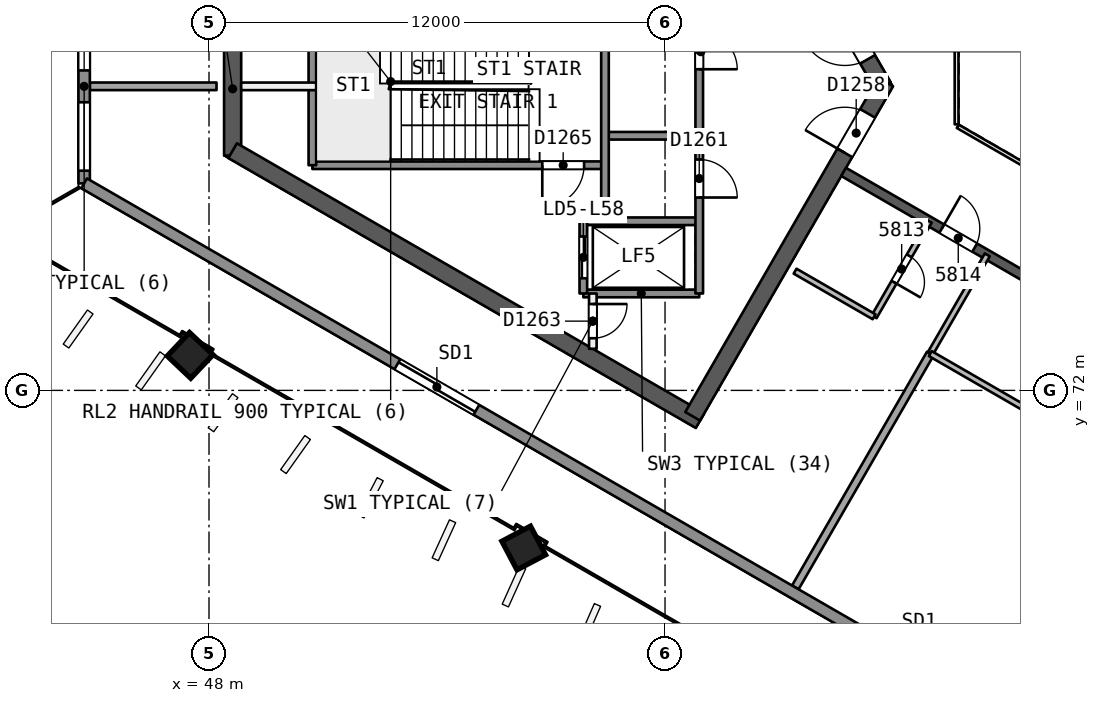
"""IFC4 building model, lengths in metres.
Left out: names, types, materials, properties, quantities, classifications, styles, units other than length and angle.
Written with IfcOpenShell. Run it as: python <this file> out.ifc"""

import sys

from ifc_helpers import new_model, si_unit, direction, frame, frame_2d, origin, origin_2d, place, context, subcontext, project, spatial, rectangle, extrude, element, fill, save


model = new_model("IFC4")
c1 = context("Model", 3, precision=1e-05, world=origin(), true_north=direction((0.0, 1.0)))
c2 = subcontext(c1, "Body", "Model", "MODEL_VIEW")
j1 = project(units=[si_unit("LENGTHUNIT", "METRE"), si_unit("PLANEANGLEUNIT", "RADIAN")], contexts=[c1])
p1 = place(None, origin())
s1 = spatial("IfcSite", under=j1, at=p1, CompositionType="ELEMENT")
p2 = place(p1, origin())
s2 = spatial("IfcBuilding", under=s1, at=p2, CompositionType="ELEMENT")
p3 = place(p2, frame((0.0, 0.0, 235.4)))
s3 = spatial("IfcBuildingStorey", under=s2, at=p3, CompositionType="ELEMENT", Elevation=235.4)
p4 = place(p3, frame((65.74, 80.0, 0.0), z_axis=(0.0, 0.0, 1.0), x_axis=(-0.499991857942, 0.866030104553, 0.0)))
e1 = element("IfcWall", 1, at=p4, inside=s3, PredefinedType="SHEAR", context=c2, shape_type="SweptSolid", body=[
    extrude(rectangle(XDim=10.25, YDim=0.45, at=frame_2d((5.125, 0.0))), origin(), (0.0, 0.0, 1.0), 3.7),
])
p5 = place(p4, frame((0.82, 0.0, 0.0)))
e2 = element("IfcOpeningElement", 2, at=p5, cuts=e1, PredefinedType="OPENING", context=c2, shape_type="SweptSolid", body=[
    extrude(rectangle(XDim=1.2, YDim=2.1, at=frame_2d((0.6, 1.05))), frame((0.0, 0.235, 0.0), z_axis=(0.0, -1.0, 0.0), x_axis=(1.0, 0.0, 0.0)), (0.0, 0.0, 1.0), 0.471),
])
p6 = place(p3, frame((48.622, 81.693, 0.0), z_axis=(0.0, 0.0, 1.0), x_axis=(0.0, -1.0, 0.0)))
e3 = element("IfcWall", 3, at=p6, inside=s3, PredefinedType="SHEAR", context=c2, shape_type="SweptSolid", body=[
    extrude(rectangle(XDim=3.515, YDim=0.45, at=frame_2d((1.758, 0.0))), origin(), (0.0, 0.0, 1.0), 3.7),
])
p7 = place(p3, frame((48.622, 78.307, 0.0), z_axis=(0.0, 0.0, 1.0), x_axis=(0.86602701116, -0.499997215934, 0.0)))
e4 = element("IfcWall", 4, at=p7, inside=s3, PredefinedType="SHEAR", context=c2, shape_type="SweptSolid", body=[
    extrude(rectangle(XDim=14.204, YDim=0.45, at=frame_2d((7.102, 0.0))), origin(), (0.0, 0.0, 1.0), 3.7),
])
p8 = place(p3, frame((60.728, 71.318, 0.0), z_axis=(0.0, 0.0, 1.0), x_axis=(0.500012416173, 0.866018235185, 0.0)))
e5 = element("IfcWall", 5, at=p8, inside=s3, PredefinedType="SHEAR", context=c2, shape_type="SweptSolid", body=[
    extrude(rectangle(XDim=10.155, YDim=0.45, at=frame_2d((5.078, 0.0))), origin(), (0.0, 0.0, 1.0), 3.7),
])
p9 = place(p8, frame((8.005, 0.0, 0.0)))
e6 = element("IfcOpeningElement", 6, at=p9, cuts=e5, PredefinedType="OPENING", context=c2, shape_type="SweptSolid", body=[
    extrude(rectangle(XDim=1.2, YDim=2.1, at=frame_2d((0.6, 1.05))), frame((0.0, 0.235, 0.0), z_axis=(0.0, -1.0, 0.0), x_axis=(1.0, 0.0, 0.0)), (0.0, 0.0, 1.0), 0.471),
])
p10 = place(p3, frame((64.7, 77.748, 0.0), z_axis=(0.0, 0.0, 1.0), x_axis=(0.866026492143, -0.499998114903, 0.0)))
e7 = element("IfcWall", 7, at=p10, inside=s3, PredefinedType="SHEAR", context=c2, shape_type="SweptSolid", body=[
    extrude(rectangle(XDim=15.588, YDim=0.25, at=frame_2d((7.794, 0.0))), origin(), (0.0, 0.0, 1.0), 3.3),
])
p11 = place(p10, frame((2.982, 0.0, 0.0)))
e8 = element("IfcOpeningElement", 8, at=p11, cuts=e7, PredefinedType="OPENING", context=c2, shape_type="SweptSolid", body=[
    extrude(rectangle(XDim=1.0, YDim=2.1, at=frame_2d((0.5, 1.05))), frame((0.0, 0.135, 0.0), z_axis=(0.0, -1.0, 0.0), x_axis=(1.0, 0.0, 0.0)), (0.0, 0.0, 1.0), 0.271),
])
p12 = place(p10, frame((8.538, 0.0, 0.0)))
e9 = element("IfcOpeningElement", 9, at=p12, cuts=e7, PredefinedType="OPENING", context=c2, shape_type="SweptSolid", body=[
    extrude(rectangle(XDim=1.1, YDim=2.1, at=frame_2d((0.55, 1.05))), frame((0.0, 0.135, 0.0), z_axis=(0.0, -1.0, 0.0), x_axis=(1.0, 0.0, 0.0)), (0.0, 0.0, 1.0), 0.271),
])
p13 = place(p10, frame((11.45, 0.0, 0.0)))
e10 = element("IfcOpeningElement", 10, at=p13, cuts=e7, PredefinedType="OPENING", context=c2, shape_type="SweptSolid", body=[
    extrude(rectangle(XDim=1.0, YDim=2.1, at=frame_2d((0.5, 1.05))), frame((0.0, 0.135, 0.0), z_axis=(0.0, -1.0, 0.0), x_axis=(1.0, 0.0, 0.0)), (0.0, 0.0, 1.0), 0.271),
])
p14 = place(p3, frame((47.469, 72.913, 0.0), z_axis=(0.028557232129, 0.006793059837, 0.999569076568), x_axis=(-0.865318806464, 0.500768292431, 0.021318547709)))
e11 = element("IfcColumn", 11, at=p14, inside=s3, PredefinedType="COLUMN", context=c2, shape_type="SweptSolid", body=[
    extrude(rectangle(XDim=0.85, YDim=0.85, at=origin_2d()), origin(), (0.0, 0.0, 1.0), 3.702),
])
p15 = place(p3, frame((56.259, 67.838, 0.0), z_axis=(0.019327242333, 0.012137244332, 0.999739538582), x_axis=(-0.865685903399, 0.500474062253, 0.01065972171)))
e12 = element("IfcColumn", 12, at=p15, inside=s3, PredefinedType="COLUMN", context=c2, shape_type="SweptSolid", body=[
    extrude(rectangle(XDim=0.85, YDim=0.85, at=origin_2d()), origin(), (0.0, 0.0, 1.0), 3.701),
])
p16 = place(p3, frame((44.864, 80.001, 0.0), z_axis=(0.0, 0.0, 1.0), x_axis=(1.0, 0.0, 0.0)))
e13 = element("IfcWall", 13, at=p16, inside=s3, PredefinedType="PARTITIONING", context=c2, shape_type="SweptSolid", body=[
    extrude(rectangle(XDim=3.334, YDim=0.2, at=frame_2d((1.667, 0.0))), origin(), (0.0, 0.0, 1.0), 3.3),
])
p17 = place(p3, frame((66.952, 76.448, 0.0), z_axis=(0.0, 0.0, 1.0), x_axis=(-0.499987231761, -0.866032775405, 0.0)))
e14 = element("IfcWall", 14, at=p17, inside=s3, PredefinedType="PARTITIONING", context=c2, shape_type="SweptSolid", body=[
    extrude(rectangle(XDim=2.9, YDim=0.15, at=frame_2d((1.45, 0.0))), origin(), (0.0, 0.0, 1.0), 3.3),
])
p18 = place(p17, frame((1.05, 0.0, 0.0)))
e15 = element("IfcOpeningElement", 15, at=p18, cuts=e14, PredefinedType="OPENING", context=c2, shape_type="SweptSolid", body=[
    extrude(rectangle(XDim=0.8, YDim=2.1, at=frame_2d((0.4, 1.05))), frame((0.0, 0.085, 0.0), z_axis=(0.0, -1.0, 0.0), x_axis=(1.0, 0.0, 0.0)), (0.0, 0.0, 1.0), 0.171),
])
p19 = place(p3, frame((65.502, 73.937, 0.0), z_axis=(0.0, 0.0, 1.0), x_axis=(-0.865994240961, 0.500053971709, 0.0)))
e16 = element("IfcWall", 16, at=p19, inside=s3, PredefinedType="PARTITIONING", context=c2, shape_type="SweptSolid", body=[
    extrude(rectangle(XDim=2.401, YDim=0.15, at=frame_2d((1.201, 0.0))), origin(), (0.0, 0.0, 1.0), 3.3),
])
p20 = place(p3, frame((63.428, 66.815, 0.0), z_axis=(0.0, 0.0, 1.0), x_axis=(0.499994154718, 0.866028778533, 0.0)))
e17 = element("IfcWall", 17, at=p20, inside=s3, PredefinedType="PARTITIONING", context=c2, shape_type="SweptSolid", body=[
    extrude(rectangle(XDim=7.104, YDim=0.2, at=frame_2d((3.552, 0.0))), origin(), (0.0, 0.0, 1.0), 3.3),
])
p21 = place(p3, frame((66.98, 72.968, 0.0), z_axis=(0.0, 0.0, 1.0), x_axis=(0.499990139034, 0.866031096941, 0.0)))
e18 = element("IfcWall", 18, at=p21, inside=s3, PredefinedType="PARTITIONING", context=c2, shape_type="SweptSolid", body=[
    extrude(rectangle(XDim=3.0, YDim=0.15, at=frame_2d((1.5, 0.0))), origin(), (0.0, 0.0, 1.0), 3.3),
])
p22 = place(p3, frame((69.491, 71.518, 0.0), z_axis=(0.0, 0.0, 1.0), x_axis=(-0.866032775405, 0.499987231761, 0.0)))
e19 = element("IfcWall", 19, at=p22, inside=s3, PredefinedType="PARTITIONING", context=c2, shape_type="SweptSolid", body=[
    extrude(rectangle(XDim=2.9, YDim=0.15, at=frame_2d((1.45, 0.0))), origin(), (0.0, 0.0, 1.0), 3.3),
])
p23 = place(p3, frame((69.098, 63.542, 0.0), z_axis=(0.0, 0.0, 1.0), x_axis=(0.499992962407, 0.866029466902, 0.0)))
e20 = element("IfcWall", 20, at=p23, inside=s3, PredefinedType="PARTITIONING", context=c2, shape_type="SweptSolid", body=[
    extrude(rectangle(XDim=10.104, YDim=0.2, at=frame_2d((5.052, 0.0))), origin(), (0.0, 0.0, 1.0), 3.3),
])
p24 = place(p3, frame((44.715, 77.448, 0.0), z_axis=(0.0, 0.0, 1.0), x_axis=(0.0, 1.0, 0.0)))
e21 = element("IfcWall", 21, at=p24, inside=s3, PredefinedType="SOLIDWALL", context=c2, shape_type="SweptSolid", body=[
    extrude(rectangle(XDim=5.105, YDim=0.3, at=frame_2d((2.552, 0.0))), origin(), (0.0, 0.0, 1.0), 3.3),
])
p25 = place(p24, frame((2.972, 0.0, 0.9)))
e22 = element("IfcOpeningElement", 22, at=p25, cuts=e21, PredefinedType="OPENING", context=c2, shape_type="SweptSolid", body=[
    extrude(rectangle(XDim=1.8, YDim=1.5, at=frame_2d((0.9, 0.75))), frame((0.0, 0.161, 0.0), z_axis=(0.0, -1.0, 0.0), x_axis=(1.0, 0.0, 0.0)), (0.0, 0.0, 1.0), 0.321),
])
p26 = place(p24, frame((0.333, 0.0, 0.9)))
e23 = element("IfcOpeningElement", 23, at=p26, cuts=e21, PredefinedType="OPENING", context=c2, shape_type="SweptSolid", body=[
    extrude(rectangle(XDim=1.8, YDim=1.5, at=frame_2d((0.9, 0.75))), frame((0.0, 0.161, 0.0), z_axis=(0.0, -1.0, 0.0), x_axis=(1.0, 0.0, 0.0)), (0.0, 0.0, 1.0), 0.321),
])
p27 = place(p3, frame((87.932, 52.496, 0.0), z_axis=(0.0, 0.0, 1.0), x_axis=(-0.866025334516, 0.500000119977, 0.0)))
e24 = element("IfcWall", 24, at=p27, inside=s3, PredefinedType="SOLIDWALL", context=c2, shape_type="SweptSolid", body=[
    extrude(rectangle(XDim=49.903, YDim=0.3, at=frame_2d((24.952, 0.0))), origin(), (0.0, 0.0, 1.0), 3.3),
])
p28 = place(p27, frame((23.907, 0.0, 0.0)))
e25 = element("IfcOpeningElement", 25, at=p28, cuts=e24, PredefinedType="OPENING", context=c2, shape_type="SweptSolid", body=[
    extrude(rectangle(XDim=2.4, YDim=2.4, at=frame_2d((1.2, 1.2))), frame((0.0, 0.161, 0.0), z_axis=(0.0, -1.0, 0.0), x_axis=(1.0, 0.0, 0.0)), (0.0, 0.0, 1.0), 0.321),
])
p29 = place(p27, frame((37.985, 0.0, 0.0)))
e26 = element("IfcOpeningElement", 26, at=p29, cuts=e24, PredefinedType="OPENING", context=c2, shape_type="SweptSolid", body=[
    extrude(rectangle(XDim=2.4, YDim=2.4, at=frame_2d((1.2, 1.2))), frame((0.0, 0.161, 0.0), z_axis=(0.0, -1.0, 0.0), x_axis=(1.0, 0.0, 0.0)), (0.0, 0.0, 1.0), 0.321),
])
p30 = place(p27, frame((9.674, 0.0, 0.0)))
e27 = element("IfcOpeningElement", 27, at=p30, cuts=e24, PredefinedType="OPENING", context=c2, shape_type="SweptSolid", body=[
    extrude(rectangle(XDim=2.4, YDim=2.4, at=frame_2d((1.2, 1.2))), frame((0.0, 0.161, 0.0), z_axis=(0.0, -1.0, 0.0), x_axis=(1.0, 0.0, 0.0)), (0.0, 0.0, 1.0), 0.321),
])
p31 = place(p3, frame((50.82, 80.0, 0.0), z_axis=(0.0, 0.0, 1.0), x_axis=(-1.0, 0.0, 0.0)))
e28 = element("IfcWall", 28, at=p31, inside=s3, PredefinedType="PARTITIONING", context=c2, shape_type="SweptSolid", body=[
    extrude(rectangle(XDim=1.973, YDim=0.2, at=frame_2d((0.987, 0.0))), origin(), (0.0, 0.0, 1.0), 3.3),
])
p32 = place(p3, frame((60.9, 78.7, 0.0), z_axis=(0.0, 0.0, 1.0), x_axis=(-1.0, 0.0, 0.0)))
e29 = element("IfcWall", 29, at=p32, inside=s3, PredefinedType="SOLIDWALL", context=c2, shape_type="SweptSolid", body=[
    extrude(rectangle(XDim=2.48, YDim=0.2, at=frame_2d((1.24, 0.0))), origin(), (0.0, 0.0, 1.0), 3.3),
])
p33 = place(p3, frame((58.42, 77.925, 0.0), z_axis=(0.0, 0.0, 1.0), x_axis=(-1.0, 0.0, 0.0)))
e30 = element("IfcWall", 30, at=p33, inside=s3, PredefinedType="SOLIDWALL", context=c2, shape_type="SweptSolid", body=[
    extrude(rectangle(XDim=7.7, YDim=0.2, at=frame_2d((3.85, 0.0))), origin(), (0.0, 0.0, 1.0), 3.3),
])
p34 = place(p33, frame((0.55, 0.0, 0.0)))
e31 = element("IfcOpeningElement", 31, at=p34, cuts=e30, PredefinedType="OPENING", context=c2, shape_type="SweptSolid", body=[
    extrude(rectangle(XDim=1.1, YDim=2.1, at=frame_2d((0.55, 1.05))), frame((0.0, 0.11, 0.0), z_axis=(0.0, -1.0, 0.0), x_axis=(1.0, 0.0, 0.0)), (0.0, 0.0, 1.0), 0.221),
])
for number, where, z_axis, x_axis in (
    (32, (60.9, 76.45, 0.0), (0.0, 0.0, 1.0), (-1.0, 0.0, 0.0)),
    (33, (60.9, 74.55, 0.0), (0.0, 0.0, 1.0), (-1.0, 0.0, 0.0)),
):
    element("IfcWall", number, at=place(p3, frame(where, z_axis=z_axis, x_axis=x_axis)), inside=s3, PredefinedType="SOLIDWALL", context=c2, shape_type="SweptSolid", body=[
        extrude(rectangle(XDim=3.05, YDim=0.2, at=frame_2d((1.525, 0.0))), origin(), (0.0, 0.0, 1.0), 3.3),
    ])
p35 = place(p3, frame((60.9, 85.45, 0.0), z_axis=(0.0, 0.0, 1.0), x_axis=(0.0, -1.0, 0.0)))
e34 = element("IfcWall", 34, at=p35, inside=s3, PredefinedType="SOLIDWALL", context=c2, shape_type="SweptSolid", body=[
    extrude(rectangle(XDim=10.9, YDim=0.2, at=frame_2d((5.45, 0.0))), origin(), (0.0, 0.0, 1.0), 3.3),
])
p36 = place(p35, frame((0.625, 0.0, 0.0)))
e35 = element("IfcOpeningElement", 35, at=p36, cuts=e34, PredefinedType="OPENING", context=c2, shape_type="SweptSolid", body=[
    extrude(rectangle(XDim=1.0, YDim=2.1, at=frame_2d((0.5, 1.05))), frame((0.0, 0.11, 0.0), z_axis=(0.0, -1.0, 0.0), x_axis=(1.0, 0.0, 0.0)), (0.0, 0.0, 1.0), 0.221),
])
p37 = place(p35, frame((4.0, 0.0, 0.0)))
e36 = element("IfcOpeningElement", 36, at=p37, cuts=e34, PredefinedType="OPENING", context=c2, shape_type="SweptSolid", body=[
    extrude(rectangle(XDim=1.0, YDim=2.1, at=frame_2d((0.5, 1.05))), frame((0.0, 0.11, 0.0), z_axis=(0.0, -1.0, 0.0), x_axis=(1.0, 0.0, 0.0)), (0.0, 0.0, 1.0), 0.221),
])
p38 = place(p35, frame((7.375, 0.0, 0.0)))
e37 = element("IfcOpeningElement", 37, at=p38, cuts=e34, PredefinedType="OPENING", context=c2, shape_type="SweptSolid", body=[
    extrude(rectangle(XDim=1.0, YDim=2.1, at=frame_2d((0.5, 1.05))), frame((0.0, 0.11, 0.0), z_axis=(0.0, -1.0, 0.0), x_axis=(1.0, 0.0, 0.0)), (0.0, 0.0, 1.0), 0.221),
])
p39 = place(p3, frame((58.42, 87.09, 0.0), z_axis=(0.0, 0.0, 1.0), x_axis=(0.0, -1.0, 0.0)))
e38 = element("IfcWall", 38, at=p39, inside=s3, PredefinedType="SOLIDWALL", context=c2, shape_type="SweptSolid", body=[
    extrude(rectangle(XDim=10.64, YDim=0.2, at=frame_2d((5.32, 0.0))), origin(), (0.0, 0.0, 1.0), 3.3),
])
p40 = place(p39, frame((0.37, 0.0, 0.0)))
e39 = element("IfcOpeningElement", 39, at=p40, cuts=e38, PredefinedType="OPENING", context=c2, shape_type="SweptSolid", body=[
    extrude(rectangle(XDim=0.9, YDim=2.1, at=frame_2d((0.45, 1.05))), frame((0.0, 0.11, 0.0), z_axis=(0.0, -1.0, 0.0), x_axis=(1.0, 0.0, 0.0)), (0.0, 0.0, 1.0), 0.221),
])
p41 = place(p3, frame((58.1, 74.55, 0.0), z_axis=(0.0, 0.0, 1.0), x_axis=(0.0, -1.0, 0.0)))
e40 = element("IfcWall", 40, at=p41, inside=s3, PredefinedType="PARTITIONING", context=c2, shape_type="SweptSolid", body=[
    extrude(rectangle(XDim=1.455, YDim=0.2, at=frame_2d((0.728, 0.0))), origin(), (0.0, 0.0, 1.0), 3.3),
])
p42 = place(p41, frame((0.278, 0.0, 0.0)))
e41 = element("IfcOpeningElement", 41, at=p42, cuts=e40, PredefinedType="OPENING", context=c2, shape_type="SweptSolid", body=[
    extrude(rectangle(XDim=0.9, YDim=2.1, at=frame_2d((0.45, 1.05))), frame((0.0, 0.11, 0.0), z_axis=(0.0, -1.0, 0.0), x_axis=(1.0, 0.0, 0.0)), (0.0, 0.0, 1.0), 0.221),
])
p43 = place(p3, frame((57.85, 76.45, 0.0), z_axis=(0.0, 0.0, 1.0), x_axis=(0.0, -1.0, 0.0)))
e42 = element("IfcWall", 42, at=p43, inside=s3, PredefinedType="SOLIDWALL", context=c2, shape_type="SweptSolid", body=[
    extrude(rectangle(XDim=1.9, YDim=0.2, at=frame_2d((0.95, 0.0))), origin(), (0.0, 0.0, 1.0), 3.3),
])
p44 = place(p43, frame((0.4, 0.0, 0.0)))
e43 = element("IfcOpeningElement", 43, at=p44, cuts=e42, PredefinedType="OPENING", context=c2, shape_type="SweptSolid", body=[
    extrude(rectangle(XDim=1.1, YDim=2.1, at=frame_2d((0.55, 1.05))), frame((0.0, 0.11, 0.0), z_axis=(0.0, -1.0, 0.0), x_axis=(1.0, 0.0, 0.0)), (0.0, 0.0, 1.0), 0.221),
])
p45 = place(p3, frame((50.72, 82.075, 0.0), z_axis=(0.0, 0.0, 1.0), x_axis=(0.0, -1.0, 0.0)))
e44 = element("IfcWall", 44, at=p45, inside=s3, PredefinedType="SOLIDWALL", context=c2, shape_type="SweptSolid", body=[
    extrude(rectangle(XDim=4.15, YDim=0.2, at=frame_2d((2.075, 0.0))), origin(), (0.0, 0.0, 1.0), 3.3),
])
p46 = place(p3, frame((67.672, 81.0, 0.0), z_axis=(0.0, 0.0, 1.0), x_axis=(0.0, -1.0, 0.0)))
e45 = element("IfcWall", 45, at=p46, inside=s3, PredefinedType="PARTITIONING", context=c2, shape_type="SweptSolid", body=[
    extrude(rectangle(XDim=2.0, YDim=0.1, at=frame_2d((1.0, 0.0))), origin(), (0.0, 0.0, 1.0), 3.3),
])
p47 = place(p3, frame((67.702, 78.948, 0.0), z_axis=(0.0, 0.0, 1.0), x_axis=(0.866026658274, -0.499997827154, 0.0)))
e46 = element("IfcWall", 46, at=p47, inside=s3, PredefinedType="PARTITIONING", context=c2, shape_type="SweptSolid", body=[
    extrude(rectangle(XDim=11.588, YDim=0.1, at=frame_2d((5.794, 0.0))), origin(), (0.0, 0.0, 1.0), 3.3),
])
p48 = place(p18, origin())
e47 = element("IfcDoor", 47, at=p48, inside=s3, OperationType="SINGLE_SWING_RIGHT", PredefinedType="NOTDEFINED", context=c2, shape_type="SweptSolid", body=[
    extrude(rectangle(XDim=0.8, YDim=2.1, at=frame_2d((0.4, 1.05))), frame((0.0, 0.025, 0.0), z_axis=(0.0, -1.0, 0.0), x_axis=(1.0, 0.0, 0.0)), (0.0, 0.0, 1.0), 0.05),
])
fill(e15, e47)
p49 = place(p11, origin())
e48 = element("IfcDoor", 48, at=p49, inside=s3, OperationType="SINGLE_SWING_LEFT", PredefinedType="NOTDEFINED", context=c2, shape_type="SweptSolid", body=[
    extrude(rectangle(XDim=1.0, YDim=2.1, at=frame_2d((0.5, 1.05))), frame((0.0, 0.025, 0.0), z_axis=(0.0, -1.0, 0.0), x_axis=(1.0, 0.0, 0.0)), (0.0, 0.0, 1.0), 0.05),
])
fill(e8, e48)
p50 = place(p25, origin())
e49 = element("IfcWindow", 49, at=p50, inside=s3, PartitioningType="SINGLE_PANEL", PredefinedType="WINDOW", context=c2, shape_type="SweptSolid", body=[
    extrude(rectangle(XDim=1.8, YDim=1.5, at=frame_2d((0.9, 0.75))), frame((0.0, 0.03, 0.0), z_axis=(0.0, -1.0, 0.0), x_axis=(1.0, 0.0, 0.0)), (0.0, 0.0, 1.0), 0.06),
])
fill(e22, e49)
p51 = place(p26, origin())
e50 = element("IfcWindow", 50, at=p51, inside=s3, PartitioningType="SINGLE_PANEL", PredefinedType="WINDOW", context=c2, shape_type="SweptSolid", body=[
    extrude(rectangle(XDim=1.8, YDim=1.5, at=frame_2d((0.9, 0.75))), frame((0.0, 0.03, 0.0), z_axis=(0.0, -1.0, 0.0), x_axis=(1.0, 0.0, 0.0)), (0.0, 0.0, 1.0), 0.06),
])
fill(e23, e50)
p52 = place(p29, origin())
e51 = element("IfcDoor", 51, at=p52, inside=s3, OperationType="SLIDING_TO_RIGHT", PredefinedType="NOTDEFINED", context=c2, shape_type="SweptSolid", body=[
    extrude(rectangle(XDim=2.4, YDim=2.4, at=frame_2d((1.2, 1.2))), frame((0.0, 0.025, 0.0), z_axis=(0.0, -1.0, 0.0), x_axis=(1.0, 0.0, 0.0)), (0.0, 0.0, 1.0), 0.05),
])
fill(e26, e51)
p53 = place(p5, origin())
e52 = element("IfcDoor", 52, at=p53, inside=s3, OperationType="SINGLE_SWING_RIGHT", PredefinedType="NOTDEFINED", context=c2, shape_type="SweptSolid", body=[
    extrude(rectangle(XDim=1.2, YDim=2.1, at=frame_2d((0.6, 1.05))), frame((0.0, 0.025, 0.0), z_axis=(0.0, -1.0, 0.0), x_axis=(1.0, 0.0, 0.0)), (0.0, 0.0, 1.0), 0.05),
])
fill(e2, e52)
p54 = place(p9, origin())
e53 = element("IfcDoor", 53, at=p54, inside=s3, OperationType="SINGLE_SWING_LEFT", PredefinedType="NOTDEFINED", context=c2, shape_type="SweptSolid", body=[
    extrude(rectangle(XDim=1.2, YDim=2.1, at=frame_2d((0.6, 1.05))), frame((0.0, 0.025, 0.0), z_axis=(0.0, -1.0, 0.0), x_axis=(1.0, 0.0, 0.0)), (0.0, 0.0, 1.0), 0.05),
])
fill(e6, e53)
p55 = place(p44, origin())
e54 = element("IfcDoor", 54, at=p55, inside=s3, OperationType="SLIDING_TO_RIGHT", PredefinedType="NOTDEFINED", context=c2, shape_type="SweptSolid", body=[
    extrude(rectangle(XDim=1.1, YDim=2.1, at=frame_2d((0.55, 1.05))), frame((0.0, 0.025, 0.0), z_axis=(0.0, -1.0, 0.0), x_axis=(1.0, 0.0, 0.0)), (0.0, 0.0, 1.0), 0.05),
])
fill(e43, e54)
p56 = place(p37, origin())
e55 = element("IfcDoor", 55, at=p56, inside=s3, OperationType="SINGLE_SWING_RIGHT", PredefinedType="NOTDEFINED", context=c2, shape_type="SweptSolid", body=[
    extrude(rectangle(XDim=1.0, YDim=2.1, at=frame_2d((0.5, 1.05))), frame((0.0, 0.025, 0.0), z_axis=(0.0, -1.0, 0.0), x_axis=(1.0, 0.0, 0.0)), (0.0, 0.0, 1.0), 0.05),
])
fill(e36, e55)
p57 = place(p38, origin())
e56 = element("IfcDoor", 56, at=p57, inside=s3, OperationType="SINGLE_SWING_RIGHT", PredefinedType="NOTDEFINED", context=c2, shape_type="SweptSolid", body=[
    extrude(rectangle(XDim=1.0, YDim=2.1, at=frame_2d((0.5, 1.05))), frame((0.0, 0.025, 0.0), z_axis=(0.0, -1.0, 0.0), x_axis=(1.0, 0.0, 0.0)), (0.0, 0.0, 1.0), 0.05),
])
fill(e37, e56)
p58 = place(p42, origin())
e57 = element("IfcDoor", 57, at=p58, inside=s3, OperationType="SINGLE_SWING_LEFT", PredefinedType="NOTDEFINED", context=c2, shape_type="SweptSolid", body=[
    extrude(rectangle(XDim=0.9, YDim=2.1, at=frame_2d((0.45, 1.05))), frame((0.0, 0.025, 0.0), z_axis=(0.0, -1.0, 0.0), x_axis=(1.0, 0.0, 0.0)), (0.0, 0.0, 1.0), 0.05),
])
fill(e41, e57)
p59 = place(p34, origin())
e58 = element("IfcDoor", 58, at=p59, inside=s3, OperationType="SINGLE_SWING_RIGHT", PredefinedType="NOTDEFINED", context=c2, shape_type="SweptSolid", body=[
    extrude(rectangle(XDim=1.1, YDim=2.1, at=frame_2d((0.55, 1.05))), frame((0.0, 0.025, 0.0), z_axis=(0.0, -1.0, 0.0), x_axis=(1.0, 0.0, 0.0)), (0.0, 0.0, 1.0), 0.05),
])
fill(e31, e58)
save(model, sys.argv[1])
